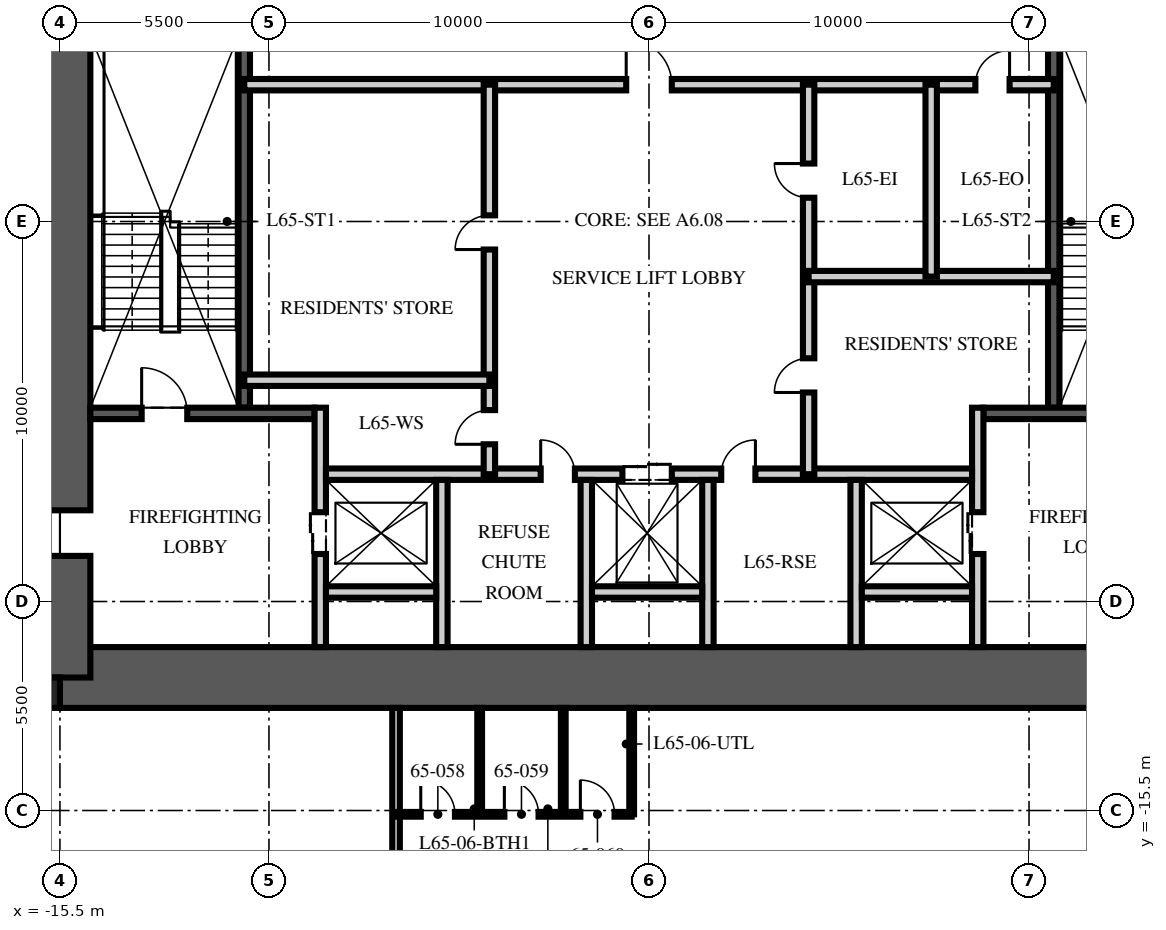
"""IFC4 building model, lengths in metres.
Left out: names, types, materials, properties, quantities, classifications, styles, units other than length and angle.
Written with IfcOpenShell. Run it as: python <this file> out.ifc"""

import sys

from ifc_helpers import new_model, si_unit, direction, frame, frame_2d, origin, origin_2d, place, context, subcontext, project, spatial, rectangle, extrude, element, fill, save


model = new_model("IFC4")
c1 = context("Model", 3, precision=1e-05, world=origin(), true_north=direction((0.0, 1.0)))
c2 = subcontext(c1, "Body", "Model", "MODEL_VIEW")
j1 = project(units=[si_unit("LENGTHUNIT", "METRE"), si_unit("PLANEANGLEUNIT", "RADIAN")], contexts=[c1])
p1 = place(None, origin())
s1 = spatial("IfcSite", under=j1, at=p1, CompositionType="ELEMENT")
p2 = place(p1, origin())
s2 = spatial("IfcBuilding", under=s1, at=p2, CompositionType="ELEMENT")
p3 = place(p2, frame((0.0, 0.0, 259.5)))
s3 = spatial("IfcBuildingStorey", under=s2, at=p3, CompositionType="ELEMENT", Elevation=259.5)
p4 = place(p3, frame((-15.5, -12.0, -0.25), z_axis=(0.0, 0.0, 1.0), x_axis=(1.0, 0.0, 0.0)))
e1 = element("IfcWall", 1, at=p4, inside=s3, PredefinedType="SHEAR", context=c2, shape_type="SweptSolid", body=[
    extrude(rectangle(XDim=31.0, YDim=1.6, at=frame_2d((15.5, 0.0))), origin(), (0.0, 0.0, 1.0), 3.75),
])
p5 = place(p3, frame((-15.5, -12.0, -0.25), z_axis=(0.0, 0.0, 1.0), x_axis=(0.0, 1.0, 0.0)))
e2 = element("IfcWall", 2, at=p5, inside=s3, PredefinedType="SHEAR", context=c2, shape_type="SweptSolid", body=[
    extrude(rectangle(XDim=24.0, YDim=1.6, at=frame_2d((12.0, 0.0))), origin(), (0.0, 0.0, 1.0), 3.75),
])
p6 = place(p5, frame((3.2, 0.0, 0.25)))
e3 = element("IfcOpeningElement", 3, at=p6, cuts=e2, PredefinedType="OPENING", context=c2, shape_type="SweptSolid", body=[
    extrude(rectangle(XDim=1.2, YDim=2.1, at=frame_2d((0.6, 1.05))), frame((0.0, 0.81, 0.0), z_axis=(0.0, -1.0, 0.0), x_axis=(1.0, 0.0, 0.0)), (0.0, 0.0, 1.0), 1.62),
])
p7 = place(p5, frame((19.3, 0.0, 0.25)))
e4 = element("IfcOpeningElement", 4, at=p7, cuts=e2, PredefinedType="OPENING", context=c2, shape_type="SweptSolid", body=[
    extrude(rectangle(XDim=1.8, YDim=2.1, at=frame_2d((0.9, 1.05))), frame((0.0, 0.81, 0.0), z_axis=(0.0, -1.0, 0.0), x_axis=(1.0, 0.0, 0.0)), (0.0, 0.0, 1.0), 1.62),
])
p8 = place(p3, frame((-15.9, -12.4, -0.25), z_axis=(0.0, 0.0, 1.0), x_axis=(1.0, 0.0, 0.0)))
e5 = element("IfcColumn", 5, at=p8, inside=s3, PredefinedType="COLUMN", context=c2, shape_type="SweptSolid", body=[
    extrude(rectangle(XDim=0.8, YDim=0.8, at=origin_2d()), origin(), (0.0, 0.0, 1.0), 3.75),
])
p9 = place(p3, frame((-10.65, -4.9, 0.0), z_axis=(0.0, 0.0, 1.0), x_axis=(0.0, 1.0, 0.0)))
e6 = element("IfcWall", 6, at=p9, inside=s3, PredefinedType="SOLIDWALL", context=c2, shape_type="SweptSolid", body=[
    extrude(rectangle(XDim=10.1, YDim=0.3, at=frame_2d((5.05, 0.0))), origin(), (0.0, 0.0, 1.0), 3.5),
])
p10 = place(p3, frame((-14.7, -5.05, 0.0), z_axis=(0.0, 0.0, 1.0), x_axis=(1.0, 0.0, 0.0)))
e7 = element("IfcWall", 7, at=p10, inside=s3, PredefinedType="SOLIDWALL", context=c2, shape_type="SweptSolid", body=[
    extrude(rectangle(XDim=5.9, YDim=0.3, at=frame_2d((2.95, 0.0))), origin(), (0.0, 0.0, 1.0), 3.5),
])
p11 = place(p10, frame((1.35, 0.0, 0.0)))
e8 = element("IfcOpeningElement", 8, at=p11, cuts=e7, PredefinedType="OPENING", context=c2, shape_type="SweptSolid", body=[
    extrude(rectangle(XDim=1.2, YDim=2.1, at=frame_2d((0.6, 1.05))), frame((0.0, 0.16, 0.0), z_axis=(0.0, -1.0, 0.0), x_axis=(1.0, 0.0, 0.0)), (0.0, 0.0, 1.0), 0.32),
])
p12 = place(p3, frame((-8.65, -11.2, 0.0), z_axis=(0.0, 0.0, 1.0), x_axis=(0.0, 1.0, 0.0)))
e9 = element("IfcWall", 9, at=p12, inside=s3, PredefinedType="PARTITIONING", context=c2, shape_type="SweptSolid", body=[
    extrude(rectangle(XDim=6.3, YDim=0.3, at=frame_2d((3.15, 0.0))), origin(), (0.0, 0.0, 1.0), 3.5),
])
p13 = place(p12, frame((2.45, 0.0, 0.0)))
e10 = element("IfcOpeningElement", 10, at=p13, cuts=e9, PredefinedType="OPENING", context=c2, shape_type="SweptSolid", body=[
    extrude(rectangle(XDim=1.1, YDim=2.1, at=frame_2d((0.55, 1.05))), frame((0.0, 0.16, 0.0), z_axis=(0.0, -1.0, 0.0), x_axis=(1.0, 0.0, 0.0)), (0.0, 0.0, 1.0), 0.32),
])
p14 = place(p3, frame((10.65, -4.9, 0.0), z_axis=(0.0, 0.0, 1.0), x_axis=(0.0, 1.0, 0.0)))
e11 = element("IfcWall", 11, at=p14, inside=s3, PredefinedType="SOLIDWALL", context=c2, shape_type="SweptSolid", body=[
    extrude(rectangle(XDim=10.1, YDim=0.3, at=frame_2d((5.05, 0.0))), origin(), (0.0, 0.0, 1.0), 3.5),
])
p15 = place(p3, frame((14.7, -5.05, 0.0), z_axis=(0.0, 0.0, 1.0), x_axis=(-1.0, 0.0, 0.0)))
e12 = element("IfcWall", 12, at=p15, inside=s3, PredefinedType="SOLIDWALL", context=c2, shape_type="SweptSolid", body=[
    extrude(rectangle(XDim=5.9, YDim=0.3, at=frame_2d((2.95, 0.0))), origin(), (0.0, 0.0, 1.0), 3.5),
])
p16 = place(p15, frame((1.35, 0.0, 0.0)))
e13 = element("IfcOpeningElement", 13, at=p16, cuts=e12, PredefinedType="OPENING", context=c2, shape_type="SweptSolid", body=[
    extrude(rectangle(XDim=1.2, YDim=2.1, at=frame_2d((0.6, 1.05))), frame((0.0, 0.16, 0.0), z_axis=(0.0, -1.0, 0.0), x_axis=(1.0, 0.0, 0.0)), (0.0, 0.0, 1.0), 0.32),
])
p17 = place(p3, frame((8.65, -11.2, 0.0), z_axis=(0.0, 0.0, 1.0), x_axis=(0.0, 1.0, 0.0)))
e14 = element("IfcWall", 14, at=p17, inside=s3, PredefinedType="PARTITIONING", context=c2, shape_type="SweptSolid", body=[
    extrude(rectangle(XDim=6.3, YDim=0.3, at=frame_2d((3.15, 0.0))), origin(), (0.0, 0.0, 1.0), 3.5),
])
p18 = place(p17, frame((2.45, 0.0, 0.0)))
e15 = element("IfcOpeningElement", 15, at=p18, cuts=e14, PredefinedType="OPENING", context=c2, shape_type="SweptSolid", body=[
    extrude(rectangle(XDim=1.1, YDim=2.1, at=frame_2d((0.55, 1.05))), frame((0.0, 0.16, 0.0), z_axis=(0.0, -1.0, 0.0), x_axis=(1.0, 0.0, 0.0)), (0.0, 0.0, 1.0), 0.32),
])
p19 = place(p3, frame((-8.5, -6.65, 0.0), z_axis=(0.0, 0.0, 1.0), x_axis=(1.0, 0.0, 0.0)))
e16 = element("IfcWall", 16, at=p19, inside=s3, PredefinedType="PARTITIONING", context=c2, shape_type="SweptSolid", body=[
    extrude(rectangle(XDim=17.0, YDim=0.3, at=frame_2d((8.5, 0.0))), origin(), (0.0, 0.0, 1.0), 3.5),
])
p20 = place(p19, frame((7.8, 0.0, 0.0)))
e17 = element("IfcOpeningElement", 17, at=p20, cuts=e16, PredefinedType="OPENING", context=c2, shape_type="SweptSolid", body=[
    extrude(rectangle(XDim=1.3, YDim=2.4, at=frame_2d((0.65, 1.2))), frame((0.0, 0.16, 0.0), z_axis=(0.0, -1.0, 0.0), x_axis=(1.0, 0.0, 0.0)), (0.0, 0.0, 1.0), 0.32),
])
p21 = place(p19, frame((5.65, 0.0, 0.0)))
e18 = element("IfcOpeningElement", 18, at=p21, cuts=e16, PredefinedType="OPENING", context=c2, shape_type="SweptSolid", body=[
    extrude(rectangle(XDim=0.9, YDim=2.1, at=frame_2d((0.45, 1.05))), frame((0.0, 0.16, 0.0), z_axis=(0.0, -1.0, 0.0), x_axis=(1.0, 0.0, 0.0)), (0.0, 0.0, 1.0), 0.32),
])
p22 = place(p19, frame((10.4, 0.0, 0.0)))
e19 = element("IfcOpeningElement", 19, at=p22, cuts=e16, PredefinedType="OPENING", context=c2, shape_type="SweptSolid", body=[
    extrude(rectangle(XDim=0.9, YDim=2.1, at=frame_2d((0.45, 1.05))), frame((0.0, 0.16, 0.0), z_axis=(0.0, -1.0, 0.0), x_axis=(1.0, 0.0, 0.0)), (0.0, 0.0, 1.0), 0.32),
])
for number, where, z_axis, x_axis in (
    (20, (-5.45, -11.2, 0.0), (0.0, 0.0, 1.0), (0.0, 1.0, 0.0)),
    (21, (-1.65, -11.2, 0.0), (0.0, 0.0, 1.0), (0.0, 1.0, 0.0)),
    (22, (1.55, -11.2, 0.0), (0.0, 0.0, 1.0), (0.0, 1.0, 0.0)),
    (23, (5.45, -11.2, 0.0), (0.0, 0.0, 1.0), (0.0, 1.0, 0.0)),
):
    element("IfcWall", number, at=place(p3, frame(where, z_axis=z_axis, x_axis=x_axis)), inside=s3, PredefinedType="PARTITIONING", context=c2, shape_type="SweptSolid", body=[
        extrude(rectangle(XDim=4.4, YDim=0.3, at=frame_2d((2.2, 0.0))), origin(), (0.0, 0.0, 1.0), 3.5),
    ])
for number, where, z_axis, x_axis in (
    (24, (-8.5, -9.75, 0.0), (0.0, 0.0, 1.0), (1.0, 0.0, 0.0)),
    (25, (-1.5, -9.75, 0.0), (0.0, 0.0, 1.0), (1.0, 0.0, 0.0)),
    (26, (5.6, -9.75, 0.0), (0.0, 0.0, 1.0), (1.0, 0.0, 0.0)),
):
    element("IfcWall", number, at=place(p3, frame(where, z_axis=z_axis, x_axis=x_axis)), inside=s3, PredefinedType="PARTITIONING", context=c2, shape_type="SweptSolid", body=[
        extrude(rectangle(XDim=2.9, YDim=0.3, at=frame_2d((1.45, 0.0))), origin(), (0.0, 0.0, 1.0), 3.5),
    ])
p23 = place(p3, frame((-10.65, 3.6, 0.0), z_axis=(0.0, 0.0, 1.0), x_axis=(1.0, 0.0, 0.0)))
e27 = element("IfcWall", 27, at=p23, inside=s3, PredefinedType="PARTITIONING", context=c2, shape_type="SweptSolid", body=[
    extrude(rectangle(XDim=21.3, YDim=0.3, at=frame_2d((10.65, 0.0))), origin(), (0.0, 0.0, 1.0), 3.5),
])
p24 = place(p23, frame((10.05, 0.0, 0.0)))
e28 = element("IfcOpeningElement", 28, at=p24, cuts=e27, PredefinedType="OPENING", context=c2, shape_type="SweptSolid", body=[
    extrude(rectangle(XDim=1.2, YDim=2.1, at=frame_2d((0.6, 1.05))), frame((0.0, 0.16, 0.0), z_axis=(0.0, -1.0, 0.0), x_axis=(1.0, 0.0, 0.0)), (0.0, 0.0, 1.0), 0.32),
])
p25 = place(p23, frame((19.238, 0.0, 0.0)))
e29 = element("IfcOpeningElement", 29, at=p25, cuts=e27, PredefinedType="OPENING", context=c2, shape_type="SweptSolid", body=[
    extrude(rectangle(XDim=0.9, YDim=2.1, at=frame_2d((0.45, 1.05))), frame((0.0, 0.16, 0.0), z_axis=(0.0, -1.0, 0.0), x_axis=(1.0, 0.0, 0.0)), (0.0, 0.0, 1.0), 0.32),
])
p26 = place(p3, frame((-4.2, -6.65, 0.0), z_axis=(0.0, 0.0, 1.0), x_axis=(0.0, 1.0, 0.0)))
e30 = element("IfcWall", 30, at=p26, inside=s3, PredefinedType="PARTITIONING", context=c2, shape_type="SweptSolid", body=[
    extrude(rectangle(XDim=10.25, YDim=0.3, at=frame_2d((5.125, 0.0))), origin(), (0.0, 0.0, 1.0), 3.5),
])
p27 = place(p26, frame((0.787, 0.0, 0.0)))
e31 = element("IfcOpeningElement", 31, at=p27, cuts=e30, PredefinedType="OPENING", context=c2, shape_type="SweptSolid", body=[
    extrude(rectangle(XDim=0.9, YDim=2.1, at=frame_2d((0.45, 1.05))), frame((0.0, 0.16, 0.0), z_axis=(0.0, -1.0, 0.0), x_axis=(1.0, 0.0, 0.0)), (0.0, 0.0, 1.0), 0.32),
])
p28 = place(p26, frame((5.912, 0.0, 0.0)))
e32 = element("IfcOpeningElement", 32, at=p28, cuts=e30, PredefinedType="OPENING", context=c2, shape_type="SweptSolid", body=[
    extrude(rectangle(XDim=0.9, YDim=2.1, at=frame_2d((0.45, 1.05))), frame((0.0, 0.16, 0.0), z_axis=(0.0, -1.0, 0.0), x_axis=(1.0, 0.0, 0.0)), (0.0, 0.0, 1.0), 0.32),
])
p29 = place(p3, frame((4.2, -6.65, 0.0), z_axis=(0.0, 0.0, 1.0), x_axis=(0.0, 1.0, 0.0)))
e33 = element("IfcWall", 33, at=p29, inside=s3, PredefinedType="PARTITIONING", context=c2, shape_type="SweptSolid", body=[
    extrude(rectangle(XDim=10.25, YDim=0.3, at=frame_2d((5.125, 0.0))), origin(), (0.0, 0.0, 1.0), 3.5),
])
p30 = place(p29, frame((2.15, 0.0, 0.0)))
e34 = element("IfcOpeningElement", 34, at=p30, cuts=e33, PredefinedType="OPENING", context=c2, shape_type="SweptSolid", body=[
    extrude(rectangle(XDim=0.9, YDim=2.1, at=frame_2d((0.45, 1.05))), frame((0.0, 0.16, 0.0), z_axis=(0.0, -1.0, 0.0), x_axis=(1.0, 0.0, 0.0)), (0.0, 0.0, 1.0), 0.32),
])
p31 = place(p29, frame((7.275, 0.0, 0.0)))
e35 = element("IfcOpeningElement", 35, at=p31, cuts=e33, PredefinedType="OPENING", context=c2, shape_type="SweptSolid", body=[
    extrude(rectangle(XDim=0.9, YDim=2.1, at=frame_2d((0.45, 1.05))), frame((0.0, 0.16, 0.0), z_axis=(0.0, -1.0, 0.0), x_axis=(1.0, 0.0, 0.0)), (0.0, 0.0, 1.0), 0.32),
])
for number, where, z_axis, x_axis in (
    (36, (-10.65, -4.177, 0.0), (0.0, 0.0, 1.0), (1.0, 0.0, 0.0)),
    (37, (10.65, -1.45, 0.0), (0.0, 0.0, 1.0), (-1.0, 0.0, 0.0)),
):
    element("IfcWall", number, at=place(p3, frame(where, z_axis=z_axis, x_axis=x_axis)), inside=s3, PredefinedType="PARTITIONING", context=c2, shape_type="SweptSolid", body=[
        extrude(rectangle(XDim=6.45, YDim=0.3, at=frame_2d((3.225, 0.0))), origin(), (0.0, 0.0, 1.0), 3.5),
    ])
p32 = place(p3, frame((7.425, -1.45, 0.0), z_axis=(0.0, 0.0, 1.0), x_axis=(0.0, 1.0, 0.0)))
e38 = element("IfcWall", 38, at=p32, inside=s3, PredefinedType="PARTITIONING", context=c2, shape_type="SweptSolid", body=[
    extrude(rectangle(XDim=5.05, YDim=0.3, at=frame_2d((2.525, 0.0))), origin(), (0.0, 0.0, 1.0), 3.5),
])
p33 = place(p3, frame((-6.656, -12.8, 0.0), z_axis=(0.0, 0.0, 1.0), x_axis=(0.0, -1.0, 0.0)))
e39 = element("IfcWall", 39, at=p33, inside=s3, PredefinedType="PARTITIONING", context=c2, shape_type="SweptSolid", body=[
    extrude(rectangle(XDim=12.9, YDim=0.2, at=frame_2d((6.45, 0.0))), origin(), (0.0, 0.0, 1.0), 2.91),
])
p34 = place(p3, frame((-6.656, -15.6, 0.0), z_axis=(0.0, 0.0, 1.0), x_axis=(1.0, 0.0, 0.0)))
e40 = element("IfcWall", 40, at=p34, inside=s3, PredefinedType="PARTITIONING", context=c2, shape_type="SweptSolid", body=[
    extrude(rectangle(XDim=6.2, YDim=0.125, at=frame_2d((3.1, 0.0))), origin(), (0.0, 0.0, 1.0), 2.81),
])
p35 = place(p34, frame((0.65, 0.0, 0.0)))
e41 = element("IfcOpeningElement", 41, at=p35, cuts=e40, PredefinedType="OPENING", context=c2, shape_type="SweptSolid", body=[
    extrude(rectangle(XDim=0.9, YDim=2.1, at=frame_2d((0.45, 1.05))), frame((0.0, 0.073, 0.0), z_axis=(0.0, -1.0, 0.0), x_axis=(1.0, 0.0, 0.0)), (0.0, 0.0, 1.0), 0.145),
])
p36 = place(p34, frame((2.85, 0.0, 0.0)))
e42 = element("IfcOpeningElement", 42, at=p36, cuts=e40, PredefinedType="OPENING", context=c2, shape_type="SweptSolid", body=[
    extrude(rectangle(XDim=0.9, YDim=2.1, at=frame_2d((0.45, 1.05))), frame((0.0, 0.073, 0.0), z_axis=(0.0, -1.0, 0.0), x_axis=(1.0, 0.0, 0.0)), (0.0, 0.0, 1.0), 0.145),
])
p37 = place(p34, frame((4.85, 0.0, 0.0)))
e43 = element("IfcOpeningElement", 43, at=p37, cuts=e40, PredefinedType="OPENING", context=c2, shape_type="SweptSolid", body=[
    extrude(rectangle(XDim=0.9, YDim=2.1, at=frame_2d((0.45, 1.05))), frame((0.0, 0.073, 0.0), z_axis=(0.0, -1.0, 0.0), x_axis=(1.0, 0.0, 0.0)), (0.0, 0.0, 1.0), 0.145),
])
for number, where, z_axis, x_axis in (
    (44, (-4.456, -12.8, 0.0), (0.0, 0.0, 1.0), (0.0, -1.0, 0.0)),
    (45, (-2.256, -12.8, 0.0), (0.0, 0.0, 1.0), (0.0, -1.0, 0.0)),
    (46, (-0.456, -12.8, 0.0), (0.0, 0.0, 1.0), (0.0, -1.0, 0.0)),
):
    element("IfcWall", number, at=place(p3, frame(where, z_axis=z_axis, x_axis=x_axis)), inside=s3, PredefinedType="PARTITIONING", context=c2, shape_type="SweptSolid", body=[
        extrude(rectangle(XDim=2.8, YDim=0.125, at=frame_2d((1.4, 0.0))), origin(), (0.0, 0.0, 1.0), 3.5),
    ])
p38 = place(p11, origin())
e47 = element("IfcDoor", 47, at=p38, inside=s3, OperationType="SINGLE_SWING_LEFT", PredefinedType="DOOR", context=c2, shape_type="SweptSolid", body=[
    extrude(rectangle(XDim=1.2, YDim=2.1, at=frame_2d((0.6, 1.05))), frame((0.0, 0.025, 0.0), z_axis=(0.0, -1.0, 0.0), x_axis=(1.0, 0.0, 0.0)), (0.0, 0.0, 1.0), 0.05),
])
fill(e8, e47)
p39 = place(p6, origin())
e48 = element("IfcDoor", 48, at=p39, inside=s3, OperationType="SINGLE_SWING_LEFT", PredefinedType="DOOR", context=c2, shape_type="SweptSolid", body=[
    extrude(rectangle(XDim=1.2, YDim=2.1, at=frame_2d((0.6, 1.05))), frame((0.0, 0.025, 0.0), z_axis=(0.0, -1.0, 0.0), x_axis=(1.0, 0.0, 0.0)), (0.0, 0.0, 1.0), 0.05),
])
fill(e3, e48)
p40 = place(p13, origin())
e49 = element("IfcDoor", 49, at=p40, inside=s3, OperationType="DOUBLE_DOOR_SLIDING", PredefinedType="DOOR", context=c2, shape_type="SweptSolid", body=[
    extrude(rectangle(XDim=1.1, YDim=2.1, at=frame_2d((0.55, 1.05))), frame((0.0, 0.025, 0.0), z_axis=(0.0, -1.0, 0.0), x_axis=(1.0, 0.0, 0.0)), (0.0, 0.0, 1.0), 0.05),
])
fill(e10, e49)
p41 = place(p18, origin())
e50 = element("IfcDoor", 50, at=p41, inside=s3, OperationType="DOUBLE_DOOR_SLIDING", PredefinedType="DOOR", context=c2, shape_type="SweptSolid", body=[
    extrude(rectangle(XDim=1.1, YDim=2.1, at=frame_2d((0.55, 1.05))), frame((0.0, 0.025, 0.0), z_axis=(0.0, -1.0, 0.0), x_axis=(1.0, 0.0, 0.0)), (0.0, 0.0, 1.0), 0.05),
])
fill(e15, e50)
p42 = place(p20, origin())
e51 = element("IfcDoor", 51, at=p42, inside=s3, OperationType="DOUBLE_DOOR_SLIDING", PredefinedType="DOOR", context=c2, shape_type="SweptSolid", body=[
    extrude(rectangle(XDim=1.3, YDim=2.4, at=frame_2d((0.65, 1.2))), frame((0.0, 0.025, 0.0), z_axis=(0.0, -1.0, 0.0), x_axis=(1.0, 0.0, 0.0)), (0.0, 0.0, 1.0), 0.05),
])
fill(e17, e51)
p43 = place(p24, origin())
e52 = element("IfcDoor", 52, at=p43, inside=s3, OperationType="SINGLE_SWING_LEFT", PredefinedType="DOOR", context=c2, shape_type="SweptSolid", body=[
    extrude(rectangle(XDim=1.2, YDim=2.1, at=frame_2d((0.6, 1.05))), frame((0.0, 0.025, 0.0), z_axis=(0.0, -1.0, 0.0), x_axis=(1.0, 0.0, 0.0)), (0.0, 0.0, 1.0), 0.05),
])
fill(e28, e52)
p44 = place(p21, origin())
e53 = element("IfcDoor", 53, at=p44, inside=s3, OperationType="SINGLE_SWING_LEFT", PredefinedType="DOOR", context=c2, shape_type="SweptSolid", body=[
    extrude(rectangle(XDim=0.9, YDim=2.1, at=frame_2d((0.45, 1.05))), frame((0.0, 0.025, 0.0), z_axis=(0.0, -1.0, 0.0), x_axis=(1.0, 0.0, 0.0)), (0.0, 0.0, 1.0), 0.05),
])
fill(e18, e53)
p45 = place(p22, origin())
e54 = element("IfcDoor", 54, at=p45, inside=s3, OperationType="SINGLE_SWING_RIGHT", PredefinedType="DOOR", context=c2, shape_type="SweptSolid", body=[
    extrude(rectangle(XDim=0.9, YDim=2.1, at=frame_2d((0.45, 1.05))), frame((0.0, 0.025, 0.0), z_axis=(0.0, -1.0, 0.0), x_axis=(1.0, 0.0, 0.0)), (0.0, 0.0, 1.0), 0.05),
])
fill(e19, e54)
p46 = place(p27, origin())
e55 = element("IfcDoor", 55, at=p46, inside=s3, OperationType="SINGLE_SWING_LEFT", PredefinedType="DOOR", context=c2, shape_type="SweptSolid", body=[
    extrude(rectangle(XDim=0.9, YDim=2.1, at=frame_2d((0.45, 1.05))), frame((0.0, 0.025, 0.0), z_axis=(0.0, -1.0, 0.0), x_axis=(1.0, 0.0, 0.0)), (0.0, 0.0, 1.0), 0.05),
])
fill(e31, e55)
p47 = place(p28, origin())
e56 = element("IfcDoor", 56, at=p47, inside=s3, OperationType="SINGLE_SWING_LEFT", PredefinedType="DOOR", context=c2, shape_type="SweptSolid", body=[
    extrude(rectangle(XDim=0.9, YDim=2.1, at=frame_2d((0.45, 1.05))), frame((0.0, 0.025, 0.0), z_axis=(0.0, -1.0, 0.0), x_axis=(1.0, 0.0, 0.0)), (0.0, 0.0, 1.0), 0.05),
])
fill(e32, e56)
p48 = place(p30, origin())
e57 = element("IfcDoor", 57, at=p48, inside=s3, OperationType="SINGLE_SWING_LEFT", PredefinedType="DOOR", context=c2, shape_type="SweptSolid", body=[
    extrude(rectangle(XDim=0.9, YDim=2.1, at=frame_2d((0.45, 1.05))), frame((0.0, 0.025, 0.0), z_axis=(0.0, -1.0, 0.0), x_axis=(1.0, 0.0, 0.0)), (0.0, 0.0, 1.0), 0.05),
])
fill(e34, e57)
p49 = place(p31, origin())
e58 = element("IfcDoor", 58, at=p49, inside=s3, OperationType="SINGLE_SWING_RIGHT", PredefinedType="DOOR", context=c2, shape_type="SweptSolid", body=[
    extrude(rectangle(XDim=0.9, YDim=2.1, at=frame_2d((0.45, 1.05))), frame((0.0, 0.025, 0.0), z_axis=(0.0, -1.0, 0.0), x_axis=(1.0, 0.0, 0.0)), (0.0, 0.0, 1.0), 0.05),
])
fill(e35, e58)
p50 = place(p25, origin())
e59 = element("IfcDoor", 59, at=p50, inside=s3, OperationType="SINGLE_SWING_RIGHT", PredefinedType="DOOR", context=c2, shape_type="SweptSolid", body=[
    extrude(rectangle(XDim=0.9, YDim=2.1, at=frame_2d((0.45, 1.05))), frame((0.0, 0.025, 0.0), z_axis=(0.0, -1.0, 0.0), x_axis=(1.0, 0.0, 0.0)), (0.0, 0.0, 1.0), 0.05),
])
fill(e29, e59)
p51 = place(p35, origin())
e60 = element("IfcDoor", 60, at=p51, inside=s3, OperationType="SINGLE_SWING_LEFT", PredefinedType="DOOR", context=c2, shape_type="SweptSolid", body=[
    extrude(rectangle(XDim=0.9, YDim=2.1, at=frame_2d((0.45, 1.05))), frame((0.0, 0.025, 0.0), z_axis=(0.0, -1.0, 0.0), x_axis=(1.0, 0.0, 0.0)), (0.0, 0.0, 1.0), 0.05),
])
fill(e41, e60)
p52 = place(p36, origin())
e61 = element("IfcDoor", 61, at=p52, inside=s3, OperationType="SINGLE_SWING_LEFT", PredefinedType="DOOR", context=c2, shape_type="SweptSolid", body=[
    extrude(rectangle(XDim=0.9, YDim=2.1, at=frame_2d((0.45, 1.05))), frame((0.0, 0.025, 0.0), z_axis=(0.0, -1.0, 0.0), x_axis=(1.0, 0.0, 0.0)), (0.0, 0.0, 1.0), 0.05),
])
fill(e42, e61)
p53 = place(p37, origin())
e62 = element("IfcDoor", 62, at=p53, inside=s3, OperationType="SINGLE_SWING_LEFT", PredefinedType="DOOR", context=c2, shape_type="SweptSolid", body=[
    extrude(rectangle(XDim=0.9, YDim=2.1, at=frame_2d((0.45, 1.05))), frame((0.0, 0.025, 0.0), z_axis=(0.0, -1.0, 0.0), x_axis=(1.0, 0.0, 0.0)), (0.0, 0.0, 1.0), 0.05),
])
fill(e43, e62)
save(model, sys.argv[1])
